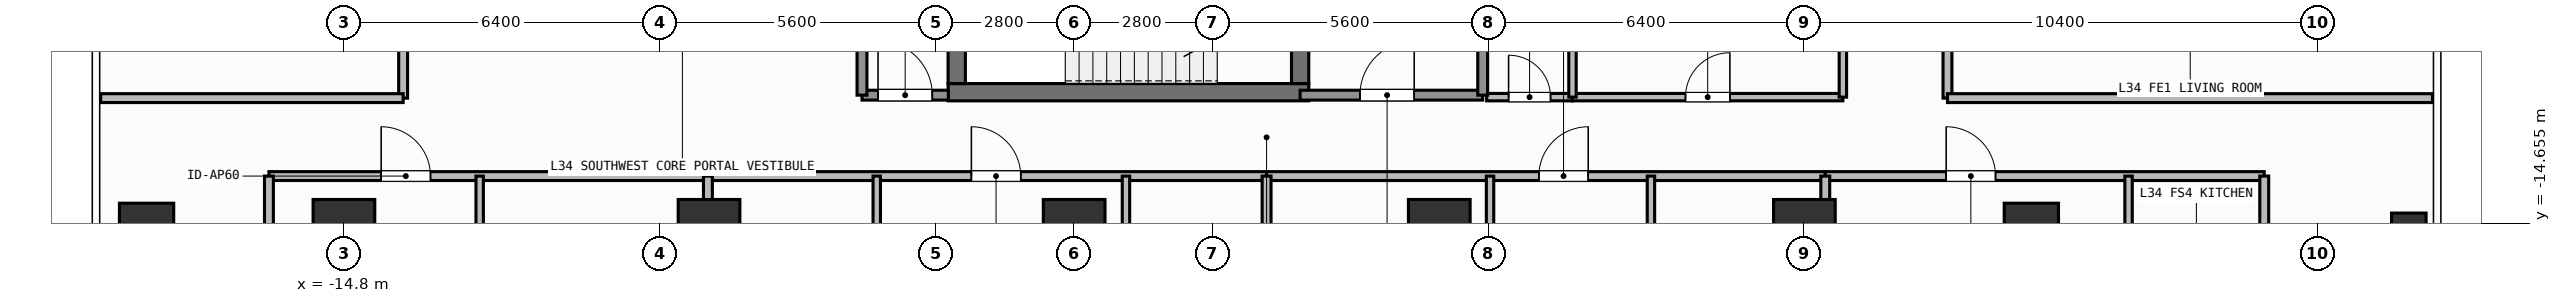
"""IFC4 building model, lengths in metres.
Left out: names, types, materials, properties, quantities, classifications, styles, units other than length and angle.
Written with IfcOpenShell. Run it as: python <this file> out.ifc"""

import sys

from ifc_helpers import new_model, si_unit, direction, frame, frame_2d, origin, origin_2d, place, context, subcontext, project, spatial, rectangle, hollow_rectangle, extrude, element, fill, save


model = new_model("IFC4")
c1 = context("Model", 3, precision=1e-05, world=origin(), true_north=direction((0.0, 1.0)))
c2 = subcontext(c1, "Body", "Model", "MODEL_VIEW")
j1 = project(units=[si_unit("LENGTHUNIT", "METRE"), si_unit("PLANEANGLEUNIT", "RADIAN")], contexts=[c1])
p1 = place(None, origin())
s1 = spatial("IfcSite", under=j1, at=p1, CompositionType="ELEMENT")
p2 = place(p1, origin())
s2 = spatial("IfcBuilding", under=s1, at=p2, CompositionType="ELEMENT")
p3 = place(p2, frame((0.0, 0.0, 136.8)))
s3 = spatial("IfcBuildingStorey", under=s2, at=p3, CompositionType="ELEMENT", Elevation=136.8)
p4 = place(p3, frame((-2.555, -12.0, 0.0), z_axis=(0.0, 0.0, 1.0), x_axis=(1.0, 0.0, 0.0)))
e1 = element("IfcWall", 1, at=p4, inside=s3, PredefinedType="SHEAR", context=c2, shape_type="SweptSolid", body=[
    extrude(rectangle(XDim=7.31, YDim=0.35, at=frame_2d((3.655, 0.0))), origin(), (0.0, 0.0, 1.0), 3.9),
])
p5 = place(p3, frame((-2.38, -11.825, 0.0), z_axis=(0.0, 0.0, 1.0), x_axis=(0.0, 1.0, 0.0)))
e2 = element("IfcWall", 2, at=p5, inside=s3, PredefinedType="SHEAR", context=c2, shape_type="SweptSolid", body=[
    extrude(rectangle(XDim=2.925, YDim=0.35, at=frame_2d((1.462, 0.0))), origin(), (0.0, 0.0, 1.0), 3.9),
])
p6 = place(p3, frame((4.58, -8.9, 0.0), z_axis=(0.0, 0.0, 1.0), x_axis=(0.0, -1.0, 0.0)))
e3 = element("IfcWall", 3, at=p6, inside=s3, PredefinedType="SHEAR", context=c2, shape_type="SweptSolid", body=[
    extrude(rectangle(XDim=2.925, YDim=0.35, at=frame_2d((1.462, 0.0))), origin(), (0.0, 0.0, 1.0), 3.9),
])
p7 = place(p6, frame((0.913, 0.0, 0.0)))
e4 = element("IfcOpeningElement", 4, at=p7, cuts=e3, PredefinedType="OPENING", context=c2, shape_type="SweptSolid", body=[
    extrude(rectangle(XDim=1.1, YDim=2.15, at=frame_2d((0.55, 1.075))), frame((0.0, 0.185, 0.0), z_axis=(0.0, -1.0, 0.0), x_axis=(1.0, 0.0, 0.0)), (0.0, 0.0, 1.0), 0.37),
])
for number, where, z_axis, x_axis in (
    (5, (-14.8, -14.8, 0.0), (0.0, 0.0, 1.0), (1.0, 0.0, 0.0)),
    (6, (-7.4, -14.8, 0.0), (0.0, 0.0, 1.0), (1.0, 0.0, 0.0)),
    (7, (0.0, -14.8, 0.0), (0.0, 0.0, 1.0), (1.0, 0.0, 0.0)),
    (8, (7.4, -14.8, 0.0), (0.0, 0.0, 1.0), (1.0, 0.0, 0.0)),
    (9, (14.8, -14.8, 0.0), (0.0, 0.0, 1.0), (1.0, 0.0, 0.0)),
):
    element("IfcColumn", number, at=place(p3, frame(where, z_axis=z_axis, x_axis=x_axis)), inside=s3, PredefinedType="COLUMN", context=c2, shape_type="SweptSolid", body=[
        extrude(rectangle(XDim=1.25, YDim=1.25, at=origin_2d()), origin(), (0.0, 0.0, 1.0), 3.9),
    ])
for number, where, z_axis, x_axis in (
    (10, (-18.8, -14.8, 0.0), (0.0, 0.0, 1.0), (1.0, 0.0, 0.0)),
    (11, (19.4, -14.8, 0.0), (0.0, 0.0, 1.0), (1.0, 0.0, 0.0)),
):
    element("IfcColumn", number, at=place(p3, frame(where, z_axis=z_axis, x_axis=x_axis)), inside=s3, PredefinedType="COLUMN", context=c2, shape_type="SweptSolid", body=[
        extrude(rectangle(XDim=1.1, YDim=1.1, at=origin_2d()), origin(), (0.0, 0.0, 1.0), 3.9),
    ])
p8 = place(p3, frame((27.05, -14.8, 0.0), z_axis=(0.0, 0.0, 1.0), x_axis=(1.0, 0.0, 0.0)))
e12 = element("IfcColumn", 12, at=p8, inside=s3, PredefinedType="COLUMN", context=c2, shape_type="SweptSolid", body=[
    extrude(hollow_rectangle(XDim=0.7, YDim=0.7, WallThickness=0.032, at=origin_2d()), origin(), (0.0, 0.0, 1.0), 3.9),
])
p9 = place(p3, frame((4.58, -12.06, 0.0), z_axis=(0.0, 0.0, 1.0), x_axis=(1.0, 0.0, 0.0)))
e13 = element("IfcWall", 13, at=p9, inside=s3, PredefinedType="SOLIDWALL", context=c2, shape_type="SweptSolid", body=[
    extrude(rectangle(XDim=3.7, YDim=0.2, at=frame_2d((1.85, 0.0))), origin(), (0.0, 0.0, 1.0), 3.68),
])
p10 = place(p9, frame((1.212, 0.0, 0.0)))
e14 = element("IfcOpeningElement", 14, at=p10, cuts=e13, PredefinedType="OPENING", context=c2, shape_type="SweptSolid", body=[
    extrude(rectangle(XDim=1.1, YDim=2.15, at=frame_2d((0.55, 1.075))), frame((0.0, 0.11, 0.0), z_axis=(0.0, -1.0, 0.0), x_axis=(1.0, 0.0, 0.0)), (0.0, 0.0, 1.0), 0.22),
])
p11 = place(p3, frame((-4.3, -12.06, 0.0), z_axis=(0.0, 0.0, 1.0), x_axis=(1.0, 0.0, 0.0)))
e15 = element("IfcWall", 15, at=p11, inside=s3, PredefinedType="SOLIDWALL", context=c2, shape_type="SweptSolid", body=[
    extrude(rectangle(XDim=1.75, YDim=0.2, at=frame_2d((0.875, 0.0))), origin(), (0.0, 0.0, 1.0), 3.68),
])
p12 = place(p11, frame((0.325, 0.0, 0.0)))
e16 = element("IfcOpeningElement", 16, at=p12, cuts=e15, PredefinedType="OPENING", context=c2, shape_type="SweptSolid", body=[
    extrude(rectangle(XDim=1.1, YDim=2.15, at=frame_2d((0.55, 1.075))), frame((0.0, 0.11, 0.0), z_axis=(0.0, -1.0, 0.0), x_axis=(1.0, 0.0, 0.0)), (0.0, 0.0, 1.0), 0.22),
])
p13 = place(p3, frame((8.36, -12.1, 0.0), z_axis=(0.0, 0.0, 1.0), x_axis=(1.0, 0.0, 0.0)))
e17 = element("IfcWall", 17, at=p13, inside=s3, PredefinedType="PARTITIONING", context=c2, shape_type="SweptSolid", body=[
    extrude(rectangle(XDim=1.74, YDim=0.15, at=frame_2d((0.87, 0.0))), origin(), (0.0, 0.0, 1.0), 3.68),
])
p14 = place(p13, frame((0.445, 0.0, 0.0)))
e18 = element("IfcOpeningElement", 18, at=p14, cuts=e17, PredefinedType="OPENING", context=c2, shape_type="SweptSolid", body=[
    extrude(rectangle(XDim=0.85, YDim=2.1, at=frame_2d((0.425, 1.05))), frame((0.0, 0.085, 0.0), z_axis=(0.0, -1.0, 0.0), x_axis=(1.0, 0.0, 0.0)), (0.0, 0.0, 1.0), 0.17),
])
p15 = place(p3, frame((10.1, -12.1, 0.0), z_axis=(0.0, 0.0, 1.0), x_axis=(1.0, 0.0, 0.0)))
e19 = element("IfcWall", 19, at=p15, inside=s3, PredefinedType="PARTITIONING", context=c2, shape_type="SweptSolid", body=[
    extrude(rectangle(XDim=5.48, YDim=0.15, at=frame_2d((2.74, 0.0))), origin(), (0.0, 0.0, 1.0), 3.68),
])
p16 = place(p15, frame((2.29, 0.0, 0.0)))
e20 = element("IfcOpeningElement", 20, at=p16, cuts=e19, PredefinedType="OPENING", context=c2, shape_type="SweptSolid", body=[
    extrude(rectangle(XDim=0.9, YDim=2.1, at=frame_2d((0.45, 1.05))), frame((0.0, 0.085, 0.0), z_axis=(0.0, -1.0, 0.0), x_axis=(1.0, 0.0, 0.0)), (0.0, 0.0, 1.0), 0.17),
])
p17 = place(p3, frame((-16.32, -13.7, 0.0), z_axis=(0.0, 0.0, 1.0), x_axis=(1.0, 0.0, 0.0)))
e21 = element("IfcWall", 21, at=p17, inside=s3, PredefinedType="PARTITIONING", context=c2, shape_type="SweptSolid", body=[
    extrude(rectangle(XDim=8.897, YDim=0.18, at=frame_2d((4.448, 0.0))), origin(), (0.0, 0.0, 1.0), 3.68),
])
p18 = place(p17, frame((2.274, 0.0, 0.0)))
e22 = element("IfcOpeningElement", 22, at=p18, cuts=e21, PredefinedType="OPENING", context=c2, shape_type="SweptSolid", body=[
    extrude(rectangle(XDim=1.0, YDim=2.2, at=frame_2d((0.5, 1.1))), frame((0.0, 0.1, 0.0), z_axis=(0.0, -1.0, 0.0), x_axis=(1.0, 0.0, 0.0)), (0.0, 0.0, 1.0), 0.2),
])
p19 = place(p3, frame((-12.049, -16.838, 0.0), z_axis=(0.0, 0.0, 1.0), x_axis=(0.0, 1.0, 0.0)))
e23 = element("IfcWall", 23, at=p19, inside=s3, PredefinedType="PARTITIONING", context=c2, shape_type="SweptSolid", body=[
    extrude(rectangle(XDim=3.138, YDim=0.15, at=frame_2d((1.569, 0.0))), origin(), (0.0, 0.0, 1.0), 3.68),
])
p20 = place(p19, frame((1.233, 0.0, 0.0)))
e24 = element("IfcOpeningElement", 24, at=p20, cuts=e23, PredefinedType="OPENING", context=c2, shape_type="SweptSolid", body=[
    extrude(rectangle(XDim=0.85, YDim=2.1, at=frame_2d((0.425, 1.05))), frame((0.0, 0.085, 0.0), z_axis=(0.0, -1.0, 0.0), x_axis=(1.0, 0.0, 0.0)), (0.0, 0.0, 1.0), 0.17),
])
p21 = place(p3, frame((-7.423, -13.7, 0.0), z_axis=(0.0, 0.0, 1.0), x_axis=(1.0, 0.0, 0.0)))
e25 = element("IfcWall", 25, at=p21, inside=s3, PredefinedType="PARTITIONING", context=c2, shape_type="SweptSolid", body=[
    extrude(rectangle(XDim=11.323, YDim=0.18, at=frame_2d((5.662, 0.0))), origin(), (0.0, 0.0, 1.0), 3.68),
])
p22 = place(p21, frame((5.34, 0.0, 0.0)))
e26 = element("IfcOpeningElement", 26, at=p22, cuts=e25, PredefinedType="OPENING", context=c2, shape_type="SweptSolid", body=[
    extrude(rectangle(XDim=1.0, YDim=2.2, at=frame_2d((0.5, 1.1))), frame((0.0, 0.1, 0.0), z_axis=(0.0, -1.0, 0.0), x_axis=(1.0, 0.0, 0.0)), (0.0, 0.0, 1.0), 0.2),
])
p23 = place(p3, frame((-4.001, -19.545, 0.0), z_axis=(0.0, 0.0, 1.0), x_axis=(0.0, 1.0, 0.0)))
e27 = element("IfcWall", 27, at=p23, inside=s3, PredefinedType="PARTITIONING", context=c2, shape_type="SweptSolid", body=[
    extrude(rectangle(XDim=5.845, YDim=0.15, at=frame_2d((2.922, 0.0))), origin(), (0.0, 0.0, 1.0), 3.68),
])
p24 = place(p23, frame((2.498, 0.0, 0.0)))
e28 = element("IfcOpeningElement", 28, at=p24, cuts=e27, PredefinedType="OPENING", context=c2, shape_type="SweptSolid", body=[
    extrude(rectangle(XDim=0.85, YDim=2.1, at=frame_2d((0.425, 1.05))), frame((0.0, 0.085, 0.0), z_axis=(0.0, -1.0, 0.0), x_axis=(1.0, 0.0, 0.0)), (0.0, 0.0, 1.0), 0.17),
])
p25 = place(p3, frame((1.05, -19.545, 0.0), z_axis=(0.0, 0.0, 1.0), x_axis=(0.0, 1.0, 0.0)))
e29 = element("IfcWall", 29, at=p25, inside=s3, PredefinedType="PARTITIONING", context=c2, shape_type="SweptSolid", body=[
    extrude(rectangle(XDim=5.845, YDim=0.15, at=frame_2d((2.922, 0.0))), origin(), (0.0, 0.0, 1.0), 3.68),
])
p26 = place(p25, frame((2.498, 0.0, 0.0)))
e30 = element("IfcOpeningElement", 30, at=p26, cuts=e29, PredefinedType="OPENING", context=c2, shape_type="SweptSolid", body=[
    extrude(rectangle(XDim=0.85, YDim=2.1, at=frame_2d((0.425, 1.05))), frame((0.0, 0.085, 0.0), z_axis=(0.0, -1.0, 0.0), x_axis=(1.0, 0.0, 0.0)), (0.0, 0.0, 1.0), 0.17),
])
p27 = place(p3, frame((3.9, -13.7, 0.0), z_axis=(0.0, 0.0, 1.0), x_axis=(1.0, 0.0, 0.0)))
e31 = element("IfcWall", 31, at=p27, inside=s3, PredefinedType="PARTITIONING", context=c2, shape_type="SweptSolid", body=[
    extrude(rectangle(XDim=11.323, YDim=0.18, at=frame_2d((5.662, 0.0))), origin(), (0.0, 0.0, 1.0), 3.68),
])
p28 = place(p27, frame((5.519, 0.0, 0.0)))
e32 = element("IfcOpeningElement", 32, at=p28, cuts=e31, PredefinedType="OPENING", context=c2, shape_type="SweptSolid", body=[
    extrude(rectangle(XDim=1.0, YDim=2.2, at=frame_2d((0.5, 1.1))), frame((0.0, 0.1, 0.0), z_axis=(0.0, -1.0, 0.0), x_axis=(1.0, 0.0, 0.0)), (0.0, 0.0, 1.0), 0.2),
])
p29 = place(p3, frame((8.429, -19.39, 0.0), z_axis=(0.0, 0.0, 1.0), x_axis=(0.0, 1.0, 0.0)))
e33 = element("IfcWall", 33, at=p29, inside=s3, PredefinedType="PARTITIONING", context=c2, shape_type="SweptSolid", body=[
    extrude(rectangle(XDim=5.69, YDim=0.15, at=frame_2d((2.845, 0.0))), origin(), (0.0, 0.0, 1.0), 3.68),
])
p30 = place(p29, frame((2.941, 0.0, 0.0)))
e34 = element("IfcOpeningElement", 34, at=p30, cuts=e33, PredefinedType="OPENING", context=c2, shape_type="SweptSolid", body=[
    extrude(rectangle(XDim=0.85, YDim=2.1, at=frame_2d((0.425, 1.05))), frame((0.0, 0.085, 0.0), z_axis=(0.0, -1.0, 0.0), x_axis=(1.0, 0.0, 0.0)), (0.0, 0.0, 1.0), 0.17),
])
p31 = place(p3, frame((11.69, -19.39, 0.0), z_axis=(0.0, 0.0, 1.0), x_axis=(0.0, 1.0, 0.0)))
e35 = element("IfcWall", 35, at=p31, inside=s3, PredefinedType="PARTITIONING", context=c2, shape_type="SweptSolid", body=[
    extrude(rectangle(XDim=5.69, YDim=0.15, at=frame_2d((2.845, 0.0))), origin(), (0.0, 0.0, 1.0), 3.68),
])
p32 = place(p31, frame((2.42, 0.0, 0.0)))
e36 = element("IfcOpeningElement", 36, at=p32, cuts=e35, PredefinedType="OPENING", context=c2, shape_type="SweptSolid", body=[
    extrude(rectangle(XDim=0.85, YDim=2.1, at=frame_2d((0.425, 1.05))), frame((0.0, 0.085, 0.0), z_axis=(0.0, -1.0, 0.0), x_axis=(1.0, 0.0, 0.0)), (0.0, 0.0, 1.0), 0.17),
])
p33 = place(p3, frame((15.223, -13.7, 0.0), z_axis=(0.0, 0.0, 1.0), x_axis=(1.0, 0.0, 0.0)))
e37 = element("IfcWall", 37, at=p33, inside=s3, PredefinedType="PARTITIONING", context=c2, shape_type="SweptSolid", body=[
    extrude(rectangle(XDim=8.897, YDim=0.18, at=frame_2d((4.449, 0.0))), origin(), (0.0, 0.0, 1.0), 3.68),
])
p34 = place(p33, frame((2.451, 0.0, 0.0)))
e38 = element("IfcOpeningElement", 38, at=p34, cuts=e37, PredefinedType="OPENING", context=c2, shape_type="SweptSolid", body=[
    extrude(rectangle(XDim=1.0, YDim=2.2, at=frame_2d((0.5, 1.1))), frame((0.0, 0.1, 0.0), z_axis=(0.0, -1.0, 0.0), x_axis=(1.0, 0.0, 0.0)), (0.0, 0.0, 1.0), 0.2),
])
p35 = place(p3, frame((21.37, -16.829, 0.0), z_axis=(0.0, 0.0, 1.0), x_axis=(0.0, 1.0, 0.0)))
e39 = element("IfcWall", 39, at=p35, inside=s3, PredefinedType="PARTITIONING", context=c2, shape_type="SweptSolid", body=[
    extrude(rectangle(XDim=3.129, YDim=0.15, at=frame_2d((1.564, 0.0))), origin(), (0.0, 0.0, 1.0), 3.68),
])
p36 = place(p35, frame((0.516, 0.0, 0.0)))
e40 = element("IfcOpeningElement", 40, at=p36, cuts=e39, PredefinedType="OPENING", context=c2, shape_type="SweptSolid", body=[
    extrude(rectangle(XDim=0.85, YDim=2.1, at=frame_2d((0.425, 1.05))), frame((0.0, 0.085, 0.0), z_axis=(0.0, -1.0, 0.0), x_axis=(1.0, 0.0, 0.0)), (0.0, 0.0, 1.0), 0.17),
])
p37 = place(p3, frame((-13.6, -12.12, 0.0), z_axis=(0.0, 0.0, 1.0), x_axis=(0.0, 1.0, 0.0)))
e41 = element("IfcWall", 41, at=p37, inside=s3, PredefinedType="PARTITIONING", context=c2, shape_type="SweptSolid", body=[
    extrude(rectangle(XDim=9.534, YDim=0.18, at=frame_2d((4.767, 0.0))), origin(), (0.0, 0.0, 1.0), 3.68),
])
p38 = place(p37, frame((1.41, 0.0, 0.0)))
e42 = element("IfcOpeningElement", 42, at=p38, cuts=e41, PredefinedType="OPENING", context=c2, shape_type="SweptSolid", body=[
    extrude(rectangle(XDim=1.0, YDim=2.2, at=frame_2d((0.5, 1.1))), frame((0.0, 0.1, 0.0), z_axis=(0.0, -1.0, 0.0), x_axis=(1.0, 0.0, 0.0)), (0.0, 0.0, 1.0), 0.2),
])
p39 = place(p3, frame((17.7, -12.12, 0.0), z_axis=(0.0, 0.0, 1.0), x_axis=(0.0, 1.0, 0.0)))
e43 = element("IfcWall", 43, at=p39, inside=s3, PredefinedType="PARTITIONING", context=c2, shape_type="SweptSolid", body=[
    extrude(rectangle(XDim=7.062, YDim=0.18, at=frame_2d((3.531, 0.0))), origin(), (0.0, 0.0, 1.0), 3.68),
])
p40 = place(p39, frame((1.237, 0.0, 0.0)))
e44 = element("IfcOpeningElement", 44, at=p40, cuts=e43, PredefinedType="OPENING", context=c2, shape_type="SweptSolid", body=[
    extrude(rectangle(XDim=1.0, YDim=2.2, at=frame_2d((0.5, 1.1))), frame((0.0, 0.1, 0.0), z_axis=(0.0, -1.0, 0.0), x_axis=(1.0, 0.0, 0.0)), (0.0, 0.0, 1.0), 0.2),
])
for number, where, z_axis, x_axis in (
    (45, (8.28, -12.06, 0.0), (0.0, 0.0, 1.0), (0.0, 1.0, 0.0)),
    (46, (-4.3, -12.06, 0.0), (0.0, 0.0, 1.0), (0.0, 1.0, 0.0)),
):
    element("IfcWall", number, at=place(p3, frame(where, z_axis=z_axis, x_axis=x_axis)), inside=s3, PredefinedType="SOLIDWALL", context=c2, shape_type="SweptSolid", body=[
        extrude(rectangle(XDim=3.185, YDim=0.2, at=frame_2d((1.593, 0.0))), origin(), (0.0, 0.0, 1.0), 3.68),
    ])
p41 = place(p3, frame((10.1, -12.1, 0.0), z_axis=(0.0, 0.0, 1.0), x_axis=(0.0, 1.0, 0.0)))
e47 = element("IfcWall", 47, at=p41, inside=s3, PredefinedType="PARTITIONING", context=c2, shape_type="SweptSolid", body=[
    extrude(rectangle(XDim=2.35, YDim=0.15, at=frame_2d((1.175, 0.0))), origin(), (0.0, 0.0, 1.0), 3.68),
])
p42 = place(p3, frame((15.58, -12.1, 0.0), z_axis=(0.0, 0.0, 1.0), x_axis=(0.0, 1.0, 0.0)))
e48 = element("IfcWall", 48, at=p42, inside=s3, PredefinedType="PARTITIONING", context=c2, shape_type="SweptSolid", body=[
    extrude(rectangle(XDim=6.25, YDim=0.15, at=frame_2d((3.125, 0.0))), origin(), (0.0, 0.0, 1.0), 3.68),
])
for number, where, z_axis, x_axis in (
    (49, (-16.32, -22.51, 0.0), (0.0, 0.0, 1.0), (0.0, 1.0, 0.0)),
    (50, (24.12, -22.51, 0.0), (0.0, 0.0, 1.0), (0.0, 1.0, 0.0)),
):
    element("IfcWall", number, at=place(p3, frame(where, z_axis=z_axis, x_axis=x_axis)), inside=s3, PredefinedType="PARTITIONING", context=c2, shape_type="SweptSolid", body=[
        extrude(rectangle(XDim=8.81, YDim=0.18, at=frame_2d((4.405, 0.0))), origin(), (0.0, 0.0, 1.0), 3.68),
    ])
p43 = place(p3, frame((-7.423, -23.63, 0.0), z_axis=(0.0, 0.0, 1.0), x_axis=(0.0, 1.0, 0.0)))
e51 = element("IfcWall", 51, at=p43, inside=s3, PredefinedType="PARTITIONING", context=c2, shape_type="SweptSolid", body=[
    extrude(rectangle(XDim=9.93, YDim=0.18, at=frame_2d((4.965, 0.0))), origin(), (0.0, 0.0, 1.0), 3.082),
])
for number, where, z_axis, x_axis in (
    (52, (3.9, -23.63, 0.0), (0.0, 0.0, 1.0), (0.0, 1.0, 0.0)),
    (53, (15.223, -23.63, 0.0), (0.0, 0.0, 1.0), (0.0, 1.0, 0.0)),
):
    element("IfcWall", number, at=place(p3, frame(where, z_axis=z_axis, x_axis=x_axis)), inside=s3, PredefinedType="PARTITIONING", context=c2, shape_type="SweptSolid", body=[
        extrude(rectangle(XDim=9.93, YDim=0.18, at=frame_2d((4.965, 0.0))), origin(), (0.0, 0.0, 1.0), 3.68),
    ])
p44 = place(p3, frame((-19.73, -12.12, 0.0), z_axis=(0.0, 0.0, 1.0), x_axis=(1.0, 0.0, 0.0)))
e54 = element("IfcWall", 54, at=p44, inside=s3, PredefinedType="PARTITIONING", context=c2, shape_type="SweptSolid", body=[
    extrude(rectangle(XDim=6.13, YDim=0.18, at=frame_2d((3.065, 0.0))), origin(), (0.0, 0.0, 1.0), 3.68),
])
p45 = place(p3, frame((17.7, -12.12, 0.0), z_axis=(0.0, 0.0, 1.0), x_axis=(1.0, 0.0, 0.0)))
e55 = element("IfcWall", 55, at=p45, inside=s3, PredefinedType="PARTITIONING", context=c2, shape_type="SweptSolid", body=[
    extrude(rectangle(XDim=9.83, YDim=0.18, at=frame_2d((4.915, 0.0))), origin(), (0.0, 0.0, 1.0), 3.68),
])
p46 = place(p10, origin())
e56 = element("IfcDoor", 56, at=p46, inside=s3, OperationType="SINGLE_SWING_RIGHT", PredefinedType="DOOR", context=c2, shape_type="SweptSolid", body=[
    extrude(rectangle(XDim=1.1, YDim=2.15, at=frame_2d((0.55, 1.075))), frame((0.0, 0.025, 0.0), z_axis=(0.0, -1.0, 0.0), x_axis=(1.0, 0.0, 0.0)), (0.0, 0.0, 1.0), 0.05),
])
fill(e14, e56)
p47 = place(p12, origin())
e57 = element("IfcDoor", 57, at=p47, inside=s3, OperationType="SINGLE_SWING_LEFT", PredefinedType="DOOR", context=c2, shape_type="SweptSolid", body=[
    extrude(rectangle(XDim=1.1, YDim=2.15, at=frame_2d((0.55, 1.075))), frame((0.0, 0.025, 0.0), z_axis=(0.0, -1.0, 0.0), x_axis=(1.0, 0.0, 0.0)), (0.0, 0.0, 1.0), 0.05),
])
fill(e16, e57)
p48 = place(p14, origin())
e58 = element("IfcDoor", 58, at=p48, inside=s3, OperationType="SINGLE_SWING_LEFT", PredefinedType="DOOR", context=c2, shape_type="SweptSolid", body=[
    extrude(rectangle(XDim=0.85, YDim=2.1, at=frame_2d((0.425, 1.05))), frame((0.0, 0.025, 0.0), z_axis=(0.0, -1.0, 0.0), x_axis=(1.0, 0.0, 0.0)), (0.0, 0.0, 1.0), 0.05),
])
fill(e18, e58)
p49 = place(p16, origin())
e59 = element("IfcDoor", 59, at=p49, inside=s3, OperationType="SINGLE_SWING_RIGHT", PredefinedType="DOOR", context=c2, shape_type="SweptSolid", body=[
    extrude(rectangle(XDim=0.9, YDim=2.1, at=frame_2d((0.45, 1.05))), frame((0.0, 0.025, 0.0), z_axis=(0.0, -1.0, 0.0), x_axis=(1.0, 0.0, 0.0)), (0.0, 0.0, 1.0), 0.05),
])
fill(e20, e59)
p50 = place(p18, origin())
e60 = element("IfcDoor", 60, at=p50, inside=s3, OperationType="SINGLE_SWING_LEFT", PredefinedType="DOOR", context=c2, shape_type="SweptSolid", body=[
    extrude(rectangle(XDim=1.0, YDim=2.2, at=frame_2d((0.5, 1.1))), frame((0.0, 0.025, 0.0), z_axis=(0.0, -1.0, 0.0), x_axis=(1.0, 0.0, 0.0)), (0.0, 0.0, 1.0), 0.05),
])
fill(e22, e60)
p51 = place(p22, origin())
e61 = element("IfcDoor", 61, at=p51, inside=s3, OperationType="SINGLE_SWING_LEFT", PredefinedType="DOOR", context=c2, shape_type="SweptSolid", body=[
    extrude(rectangle(XDim=1.0, YDim=2.2, at=frame_2d((0.5, 1.1))), frame((0.0, 0.025, 0.0), z_axis=(0.0, -1.0, 0.0), x_axis=(1.0, 0.0, 0.0)), (0.0, 0.0, 1.0), 0.05),
])
fill(e26, e61)
p52 = place(p28, origin())
e62 = element("IfcDoor", 62, at=p52, inside=s3, OperationType="SINGLE_SWING_RIGHT", PredefinedType="DOOR", context=c2, shape_type="SweptSolid", body=[
    extrude(rectangle(XDim=1.0, YDim=2.2, at=frame_2d((0.5, 1.1))), frame((0.0, 0.025, 0.0), z_axis=(0.0, -1.0, 0.0), x_axis=(1.0, 0.0, 0.0)), (0.0, 0.0, 1.0), 0.05),
])
fill(e32, e62)
p53 = place(p34, origin())
e63 = element("IfcDoor", 63, at=p53, inside=s3, OperationType="SINGLE_SWING_LEFT", PredefinedType="DOOR", context=c2, shape_type="SweptSolid", body=[
    extrude(rectangle(XDim=1.0, YDim=2.2, at=frame_2d((0.5, 1.1))), frame((0.0, 0.025, 0.0), z_axis=(0.0, -1.0, 0.0), x_axis=(1.0, 0.0, 0.0)), (0.0, 0.0, 1.0), 0.05),
])
fill(e38, e63)
save(model, sys.argv[1])
